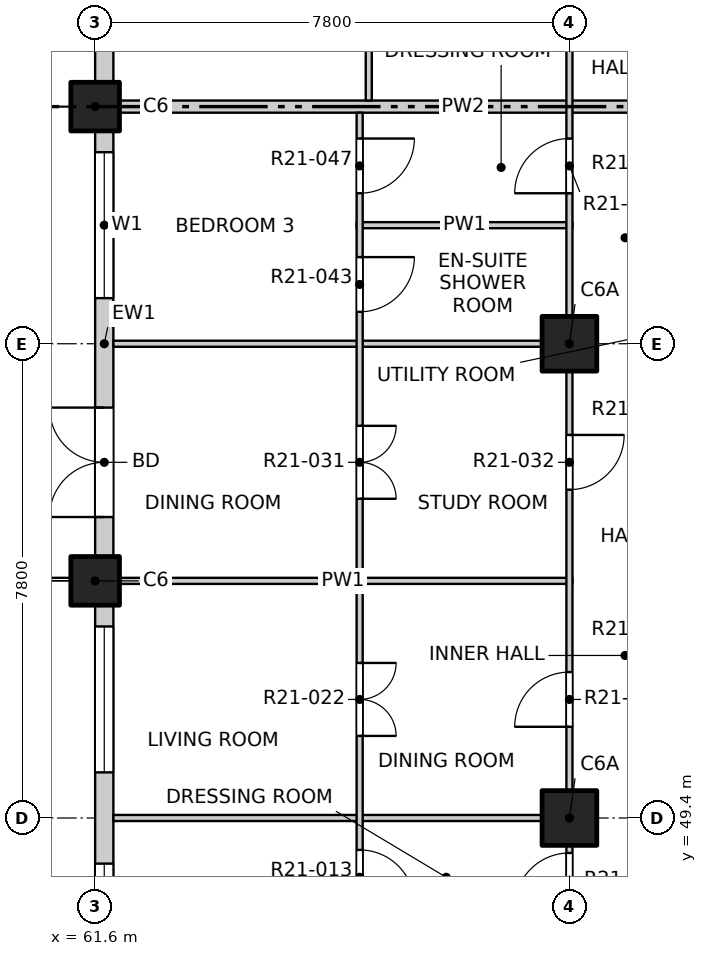
"""IFC4 building model, lengths in metres.
Left out: names, types, materials, properties, quantities, classifications, styles, units other than length and angle.
Written with IfcOpenShell. Run it as: python <this file> out.ifc"""

import sys

from ifc_helpers import new_model, si_unit, direction, frame, frame_2d, origin, origin_2d, place, context, subcontext, project, spatial, rectangle, extrude, element, fill, save


model = new_model("IFC4")
c1 = context("Model", 3, precision=1e-05, world=origin(), true_north=direction((0.0, 1.0)))
c2 = subcontext(c1, "Body", "Model", "MODEL_VIEW")
j1 = project(units=[si_unit("LENGTHUNIT", "METRE"), si_unit("PLANEANGLEUNIT", "RADIAN")], contexts=[c1])
p1 = place(None, origin())
s1 = spatial("IfcSite", under=j1, at=p1, CompositionType="ELEMENT")
p2 = place(p1, origin())
s2 = spatial("IfcBuilding", under=s1, at=p2, CompositionType="ELEMENT")
p3 = place(p2, frame((0.0, 0.0, 214.3)))
s3 = spatial("IfcBuildingStorey", under=s2, at=p3, CompositionType="ELEMENT", Elevation=214.3)
for number, where, z_axis, x_axis in (
    (1, (61.6, 53.3, -0.25), (0.0, 0.0, 1.0), (1.0, 0.0, 0.0)),
    (2, (61.6, 61.1, -0.25), (0.0, 0.0, 1.0), (1.0, 0.0, 0.0)),
):
    element("IfcColumn", number, at=place(p3, frame(where, z_axis=z_axis, x_axis=x_axis)), inside=s3, PredefinedType="COLUMN", context=c2, shape_type="SweptSolid", body=[
        extrude(rectangle(XDim=0.8, YDim=0.8, at=origin_2d()), origin(), (0.0, 0.0, 1.0), 3.4),
    ])
for number, where, z_axis, x_axis in (
    (3, (69.4, 49.4, -0.25), (0.0, 0.0, 1.0), (1.0, 0.0, 0.0)),
    (4, (69.4, 57.2, -0.25), (0.0, 0.0, 1.0), (1.0, 0.0, 0.0)),
):
    element("IfcColumn", number, at=place(p3, frame(where, z_axis=z_axis, x_axis=x_axis)), inside=s3, PredefinedType="COLUMN", context=c2, shape_type="SweptSolid", body=[
        extrude(rectangle(XDim=0.9, YDim=0.9, at=origin_2d()), origin(), (0.0, 0.0, 1.0), 3.4),
    ])
p4 = place(p3, frame((61.75, 45.5, 0.0), z_axis=(0.0, 0.0, 1.0), x_axis=(0.0, 1.0, 0.0)))
e5 = element("IfcWall", 5, at=p4, inside=s3, PredefinedType="SOLIDWALL", context=c2, shape_type="SweptSolid", body=[
    extrude(rectangle(XDim=7.4, YDim=0.3, at=frame_2d((3.7, 0.0))), origin(), (0.0, 0.0, 1.0), 2.7),
])
p5 = place(p4, frame((0.75, 0.0, 0.9)))
e6 = element("IfcOpeningElement", 6, at=p5, cuts=e5, PredefinedType="OPENING", context=c2, shape_type="SweptSolid", body=[
    extrude(rectangle(XDim=2.4, YDim=1.8, at=frame_2d((1.2, 0.9))), frame((0.0, 0.16, 0.0), z_axis=(0.0, -1.0, 0.0), x_axis=(1.0, 0.0, 0.0)), (0.0, 0.0, 1.0), 0.32),
])
p6 = place(p4, frame((4.65, 0.0, 0.9)))
e7 = element("IfcOpeningElement", 7, at=p6, cuts=e5, PredefinedType="OPENING", context=c2, shape_type="SweptSolid", body=[
    extrude(rectangle(XDim=2.4, YDim=1.8, at=frame_2d((1.2, 0.9))), frame((0.0, 0.16, 0.0), z_axis=(0.0, -1.0, 0.0), x_axis=(1.0, 0.0, 0.0)), (0.0, 0.0, 1.0), 0.32),
])
p7 = place(p3, frame((61.75, 53.7, 0.0), z_axis=(0.0, 0.0, 1.0), x_axis=(0.0, 1.0, 0.0)))
e8 = element("IfcWall", 8, at=p7, inside=s3, PredefinedType="SOLIDWALL", context=c2, shape_type="SweptSolid", body=[
    extrude(rectangle(XDim=7.0, YDim=0.3, at=frame_2d((3.5, 0.0))), origin(), (0.0, 0.0, 1.0), 2.7),
])
p8 = place(p7, frame((0.65, 0.0, 0.0)))
e9 = element("IfcOpeningElement", 9, at=p8, cuts=e8, PredefinedType="OPENING", context=c2, shape_type="SweptSolid", body=[
    extrude(rectangle(XDim=1.8, YDim=2.4, at=frame_2d((0.9, 1.2))), frame((0.0, 0.16, 0.0), z_axis=(0.0, -1.0, 0.0), x_axis=(1.0, 0.0, 0.0)), (0.0, 0.0, 1.0), 0.32),
])
p9 = place(p7, frame((4.25, 0.0, 0.9)))
e10 = element("IfcOpeningElement", 10, at=p9, cuts=e8, PredefinedType="OPENING", context=c2, shape_type="SweptSolid", body=[
    extrude(rectangle(XDim=2.4, YDim=1.8, at=frame_2d((1.2, 0.9))), frame((0.0, 0.16, 0.0), z_axis=(0.0, -1.0, 0.0), x_axis=(1.0, 0.0, 0.0)), (0.0, 0.0, 1.0), 0.32),
])
p10 = place(p3, frame((61.75, 61.5, 0.0), z_axis=(0.0, 0.0, 1.0), x_axis=(0.0, 1.0, 0.0)))
e11 = element("IfcWall", 11, at=p10, inside=s3, PredefinedType="SOLIDWALL", context=c2, shape_type="SweptSolid", body=[
    extrude(rectangle(XDim=7.0, YDim=0.3, at=frame_2d((3.5, 0.0))), origin(), (0.0, 0.0, 1.0), 2.7),
])
p11 = place(p10, frame((0.65, 0.0, 0.0)))
e12 = element("IfcOpeningElement", 12, at=p11, cuts=e11, PredefinedType="OPENING", context=c2, shape_type="SweptSolid", body=[
    extrude(rectangle(XDim=1.8, YDim=2.4, at=frame_2d((0.9, 1.2))), frame((0.0, 0.16, 0.0), z_axis=(0.0, -1.0, 0.0), x_axis=(1.0, 0.0, 0.0)), (0.0, 0.0, 1.0), 0.32),
])
p12 = place(p10, frame((4.25, 0.0, 0.9)))
e13 = element("IfcOpeningElement", 13, at=p12, cuts=e11, PredefinedType="OPENING", context=c2, shape_type="SweptSolid", body=[
    extrude(rectangle(XDim=2.4, YDim=1.8, at=frame_2d((1.2, 0.9))), frame((0.0, 0.16, 0.0), z_axis=(0.0, -1.0, 0.0), x_axis=(1.0, 0.0, 0.0)), (0.0, 0.0, 1.0), 0.32),
])
for number, where, z_axis, x_axis in (
    (14, (61.9, 49.4, 0.0), (0.0, 0.0, 1.0), (1.0, 0.0, 0.0)),
    (15, (61.9, 53.3, 0.0), (0.0, 0.0, 1.0), (1.0, 0.0, 0.0)),
    (16, (61.9, 57.2, 0.0), (0.0, 0.0, 1.0), (1.0, 0.0, 0.0)),
):
    element("IfcWall", number, at=place(p3, frame(where, z_axis=z_axis, x_axis=x_axis)), inside=s3, PredefinedType="PARTITIONING", context=c2, shape_type="SweptSolid", body=[
        extrude(rectangle(XDim=7.55, YDim=0.1, at=frame_2d((3.775, 0.0))), origin(), (0.0, 0.0, 1.0), 3.15),
    ])
p13 = place(p3, frame((65.9, 59.15, 0.0), z_axis=(0.0, 0.0, 1.0), x_axis=(1.0, 0.0, 0.0)))
e17 = element("IfcWall", 17, at=p13, inside=s3, PredefinedType="PARTITIONING", context=c2, shape_type="SweptSolid", body=[
    extrude(rectangle(XDim=3.55, YDim=0.1, at=frame_2d((1.775, 0.0))), origin(), (0.0, 0.0, 1.0), 3.15),
])
p14 = place(p3, frame((61.9, 61.1, 0.0), z_axis=(0.0, 0.0, 1.0), x_axis=(1.0, 0.0, 0.0)))
e18 = element("IfcWall", 18, at=p14, inside=s3, PredefinedType="PARTITIONING", context=c2, shape_type="SweptSolid", body=[
    extrude(rectangle(XDim=11.5, YDim=0.2, at=frame_2d((5.75, 0.0))), origin(), (0.0, 0.0, 1.0), 2.55),
])
p15 = place(p3, frame((65.95, 41.9, 0.0), z_axis=(0.0, 0.0, 1.0), x_axis=(0.0, 1.0, 0.0)))
e19 = element("IfcWall", 19, at=p15, inside=s3, PredefinedType="PARTITIONING", context=c2, shape_type="SweptSolid", body=[
    extrude(rectangle(XDim=19.1, YDim=0.1, at=frame_2d((9.55, 0.0))), origin(), (0.0, 0.0, 1.0), 3.15),
])
p16 = place(p15, frame((1.05, 0.0, 0.0)))
e20 = element("IfcOpeningElement", 20, at=p16, cuts=e19, PredefinedType="OPENING", context=c2, shape_type="SweptSolid", body=[
    extrude(rectangle(XDim=1.2, YDim=2.1, at=frame_2d((0.6, 1.05))), frame((0.0, 0.06, 0.0), z_axis=(0.0, -1.0, 0.0), x_axis=(1.0, 0.0, 0.0)), (0.0, 0.0, 1.0), 0.12),
])
p17 = place(p15, frame((4.125, 0.0, 0.0)))
e21 = element("IfcOpeningElement", 21, at=p17, cuts=e19, PredefinedType="OPENING", context=c2, shape_type="SweptSolid", body=[
    extrude(rectangle(XDim=0.9, YDim=2.1, at=frame_2d((0.45, 1.05))), frame((0.0, 0.06, 0.0), z_axis=(0.0, -1.0, 0.0), x_axis=(1.0, 0.0, 0.0)), (0.0, 0.0, 1.0), 0.12),
])
p18 = place(p15, frame((6.075, 0.0, 0.0)))
e22 = element("IfcOpeningElement", 22, at=p18, cuts=e19, PredefinedType="OPENING", context=c2, shape_type="SweptSolid", body=[
    extrude(rectangle(XDim=0.9, YDim=2.1, at=frame_2d((0.45, 1.05))), frame((0.0, 0.06, 0.0), z_axis=(0.0, -1.0, 0.0), x_axis=(1.0, 0.0, 0.0)), (0.0, 0.0, 1.0), 0.12),
])
p19 = place(p15, frame((8.85, 0.0, 0.0)))
e23 = element("IfcOpeningElement", 23, at=p19, cuts=e19, PredefinedType="OPENING", context=c2, shape_type="SweptSolid", body=[
    extrude(rectangle(XDim=1.2, YDim=2.1, at=frame_2d((0.6, 1.05))), frame((0.0, 0.06, 0.0), z_axis=(0.0, -1.0, 0.0), x_axis=(1.0, 0.0, 0.0)), (0.0, 0.0, 1.0), 0.12),
])
p20 = place(p15, frame((12.75, 0.0, 0.0)))
e24 = element("IfcOpeningElement", 24, at=p20, cuts=e19, PredefinedType="OPENING", context=c2, shape_type="SweptSolid", body=[
    extrude(rectangle(XDim=1.2, YDim=2.1, at=frame_2d((0.6, 1.05))), frame((0.0, 0.06, 0.0), z_axis=(0.0, -1.0, 0.0), x_axis=(1.0, 0.0, 0.0)), (0.0, 0.0, 1.0), 0.12),
])
p21 = place(p15, frame((15.825, 0.0, 0.0)))
e25 = element("IfcOpeningElement", 25, at=p21, cuts=e19, PredefinedType="OPENING", context=c2, shape_type="SweptSolid", body=[
    extrude(rectangle(XDim=0.9, YDim=2.1, at=frame_2d((0.45, 1.05))), frame((0.0, 0.06, 0.0), z_axis=(0.0, -1.0, 0.0), x_axis=(1.0, 0.0, 0.0)), (0.0, 0.0, 1.0), 0.12),
])
p22 = place(p15, frame((17.775, 0.0, 0.0)))
e26 = element("IfcOpeningElement", 26, at=p22, cuts=e19, PredefinedType="OPENING", context=c2, shape_type="SweptSolid", body=[
    extrude(rectangle(XDim=0.9, YDim=2.1, at=frame_2d((0.45, 1.05))), frame((0.0, 0.06, 0.0), z_axis=(0.0, -1.0, 0.0), x_axis=(1.0, 0.0, 0.0)), (0.0, 0.0, 1.0), 0.12),
])
p23 = place(p3, frame((66.1, 61.2, 0.0), z_axis=(0.0, 0.0, 1.0), x_axis=(0.0, 1.0, 0.0)))
e27 = element("IfcWall", 27, at=p23, inside=s3, PredefinedType="PARTITIONING", context=c2, shape_type="SweptSolid", body=[
    extrude(rectangle(XDim=26.9, YDim=0.1, at=frame_2d((13.45, 0.0))), origin(), (0.0, 0.0, 1.0), 3.15),
])
p24 = place(p23, frame((1.25, 0.0, 0.0)))
e28 = element("IfcOpeningElement", 28, at=p24, cuts=e27, PredefinedType="OPENING", context=c2, shape_type="SweptSolid", body=[
    extrude(rectangle(XDim=1.2, YDim=2.1, at=frame_2d((0.6, 1.05))), frame((0.0, 0.06, 0.0), z_axis=(0.0, -1.0, 0.0), x_axis=(1.0, 0.0, 0.0)), (0.0, 0.0, 1.0), 0.12),
])
p25 = place(p23, frame((5.15, 0.0, 0.0)))
e29 = element("IfcOpeningElement", 29, at=p25, cuts=e27, PredefinedType="OPENING", context=c2, shape_type="SweptSolid", body=[
    extrude(rectangle(XDim=1.2, YDim=2.1, at=frame_2d((0.6, 1.05))), frame((0.0, 0.06, 0.0), z_axis=(0.0, -1.0, 0.0), x_axis=(1.0, 0.0, 0.0)), (0.0, 0.0, 1.0), 0.12),
])
p26 = place(p23, frame((8.225, 0.0, 0.0)))
e30 = element("IfcOpeningElement", 30, at=p26, cuts=e27, PredefinedType="OPENING", context=c2, shape_type="SweptSolid", body=[
    extrude(rectangle(XDim=0.9, YDim=2.1, at=frame_2d((0.45, 1.05))), frame((0.0, 0.06, 0.0), z_axis=(0.0, -1.0, 0.0), x_axis=(1.0, 0.0, 0.0)), (0.0, 0.0, 1.0), 0.12),
])
p27 = place(p23, frame((10.175, 0.0, 0.0)))
e31 = element("IfcOpeningElement", 31, at=p27, cuts=e27, PredefinedType="OPENING", context=c2, shape_type="SweptSolid", body=[
    extrude(rectangle(XDim=0.9, YDim=2.1, at=frame_2d((0.45, 1.05))), frame((0.0, 0.06, 0.0), z_axis=(0.0, -1.0, 0.0), x_axis=(1.0, 0.0, 0.0)), (0.0, 0.0, 1.0), 0.12),
])
p28 = place(p23, frame((12.125, 0.0, 0.0)))
e32 = element("IfcOpeningElement", 32, at=p28, cuts=e27, PredefinedType="OPENING", context=c2, shape_type="SweptSolid", body=[
    extrude(rectangle(XDim=0.9, YDim=2.1, at=frame_2d((0.45, 1.05))), frame((0.0, 0.06, 0.0), z_axis=(0.0, -1.0, 0.0), x_axis=(1.0, 0.0, 0.0)), (0.0, 0.0, 1.0), 0.12),
])
p29 = place(p23, frame((14.075, 0.0, 0.0)))
e33 = element("IfcOpeningElement", 33, at=p29, cuts=e27, PredefinedType="OPENING", context=c2, shape_type="SweptSolid", body=[
    extrude(rectangle(XDim=0.9, YDim=2.1, at=frame_2d((0.45, 1.05))), frame((0.0, 0.06, 0.0), z_axis=(0.0, -1.0, 0.0), x_axis=(1.0, 0.0, 0.0)), (0.0, 0.0, 1.0), 0.12),
])
p30 = place(p23, frame((16.85, 0.0, 0.0)))
e34 = element("IfcOpeningElement", 34, at=p30, cuts=e27, PredefinedType="OPENING", context=c2, shape_type="SweptSolid", body=[
    extrude(rectangle(XDim=1.2, YDim=2.1, at=frame_2d((0.6, 1.05))), frame((0.0, 0.06, 0.0), z_axis=(0.0, -1.0, 0.0), x_axis=(1.0, 0.0, 0.0)), (0.0, 0.0, 1.0), 0.12),
])
p31 = place(p23, frame((19.925, 0.0, 0.0)))
e35 = element("IfcOpeningElement", 35, at=p31, cuts=e27, PredefinedType="OPENING", context=c2, shape_type="SweptSolid", body=[
    extrude(rectangle(XDim=0.9, YDim=2.1, at=frame_2d((0.45, 1.05))), frame((0.0, 0.06, 0.0), z_axis=(0.0, -1.0, 0.0), x_axis=(1.0, 0.0, 0.0)), (0.0, 0.0, 1.0), 0.12),
])
p32 = place(p23, frame((21.875, 0.0, 0.0)))
e36 = element("IfcOpeningElement", 36, at=p32, cuts=e27, PredefinedType="OPENING", context=c2, shape_type="SweptSolid", body=[
    extrude(rectangle(XDim=0.9, YDim=2.1, at=frame_2d((0.45, 1.05))), frame((0.0, 0.06, 0.0), z_axis=(0.0, -1.0, 0.0), x_axis=(1.0, 0.0, 0.0)), (0.0, 0.0, 1.0), 0.12),
])
p33 = place(p23, frame((24.65, 0.0, 0.0)))
e37 = element("IfcOpeningElement", 37, at=p33, cuts=e27, PredefinedType="OPENING", context=c2, shape_type="SweptSolid", body=[
    extrude(rectangle(XDim=1.2, YDim=2.1, at=frame_2d((0.6, 1.05))), frame((0.0, 0.06, 0.0), z_axis=(0.0, -1.0, 0.0), x_axis=(1.0, 0.0, 0.0)), (0.0, 0.0, 1.0), 0.12),
])
p34 = place(p3, frame((69.4, 41.9, 0.0), z_axis=(0.0, 0.0, 1.0), x_axis=(0.0, 1.0, 0.0)))
e38 = element("IfcWall", 38, at=p34, inside=s3, PredefinedType="PARTITIONING", context=c2, shape_type="SweptSolid", body=[
    extrude(rectangle(XDim=46.2, YDim=0.1, at=frame_2d((23.1, 0.0))), origin(), (0.0, 0.0, 1.0), 3.15),
])
p35 = place(p34, frame((1.2, 0.0, 0.0)))
e39 = element("IfcOpeningElement", 39, at=p35, cuts=e38, PredefinedType="OPENING", context=c2, shape_type="SweptSolid", body=[
    extrude(rectangle(XDim=0.9, YDim=2.1, at=frame_2d((0.45, 1.05))), frame((0.0, 0.06, 0.0), z_axis=(0.0, -1.0, 0.0), x_axis=(1.0, 0.0, 0.0)), (0.0, 0.0, 1.0), 0.12),
])
p36 = place(p34, frame((6.025, 0.0, 0.0)))
e40 = element("IfcOpeningElement", 40, at=p36, cuts=e38, PredefinedType="OPENING", context=c2, shape_type="SweptSolid", body=[
    extrude(rectangle(XDim=0.9, YDim=2.1, at=frame_2d((0.45, 1.05))), frame((0.0, 0.06, 0.0), z_axis=(0.0, -1.0, 0.0), x_axis=(1.0, 0.0, 0.0)), (0.0, 0.0, 1.0), 0.12),
])
p37 = place(p34, frame((9.0, 0.0, 0.0)))
e41 = element("IfcOpeningElement", 41, at=p37, cuts=e38, PredefinedType="OPENING", context=c2, shape_type="SweptSolid", body=[
    extrude(rectangle(XDim=0.9, YDim=2.1, at=frame_2d((0.45, 1.05))), frame((0.0, 0.06, 0.0), z_axis=(0.0, -1.0, 0.0), x_axis=(1.0, 0.0, 0.0)), (0.0, 0.0, 1.0), 0.12),
])
p38 = place(p34, frame((12.9, 0.0, 0.0)))
e42 = element("IfcOpeningElement", 42, at=p38, cuts=e38, PredefinedType="OPENING", context=c2, shape_type="SweptSolid", body=[
    extrude(rectangle(XDim=0.9, YDim=2.1, at=frame_2d((0.45, 1.05))), frame((0.0, 0.06, 0.0), z_axis=(0.0, -1.0, 0.0), x_axis=(1.0, 0.0, 0.0)), (0.0, 0.0, 1.0), 0.12),
])
p39 = place(p34, frame((17.775, 0.0, 0.0)))
e43 = element("IfcOpeningElement", 43, at=p39, cuts=e38, PredefinedType="OPENING", context=c2, shape_type="SweptSolid", body=[
    extrude(rectangle(XDim=0.9, YDim=2.1, at=frame_2d((0.45, 1.05))), frame((0.0, 0.06, 0.0), z_axis=(0.0, -1.0, 0.0), x_axis=(1.0, 0.0, 0.0)), (0.0, 0.0, 1.0), 0.12),
])
p40 = place(p34, frame((20.7, 0.0, 0.0)))
e44 = element("IfcOpeningElement", 44, at=p40, cuts=e38, PredefinedType="OPENING", context=c2, shape_type="SweptSolid", body=[
    extrude(rectangle(XDim=0.9, YDim=2.1, at=frame_2d((0.45, 1.05))), frame((0.0, 0.06, 0.0), z_axis=(0.0, -1.0, 0.0), x_axis=(1.0, 0.0, 0.0)), (0.0, 0.0, 1.0), 0.12),
])
p41 = place(p34, frame((24.6, 0.0, 0.0)))
e45 = element("IfcOpeningElement", 45, at=p41, cuts=e38, PredefinedType="OPENING", context=c2, shape_type="SweptSolid", body=[
    extrude(rectangle(XDim=0.9, YDim=2.1, at=frame_2d((0.45, 1.05))), frame((0.0, 0.06, 0.0), z_axis=(0.0, -1.0, 0.0), x_axis=(1.0, 0.0, 0.0)), (0.0, 0.0, 1.0), 0.12),
])
p42 = place(p34, frame((29.425, 0.0, 0.0)))
e46 = element("IfcOpeningElement", 46, at=p42, cuts=e38, PredefinedType="OPENING", context=c2, shape_type="SweptSolid", body=[
    extrude(rectangle(XDim=0.9, YDim=2.1, at=frame_2d((0.45, 1.05))), frame((0.0, 0.06, 0.0), z_axis=(0.0, -1.0, 0.0), x_axis=(1.0, 0.0, 0.0)), (0.0, 0.0, 1.0), 0.12),
])
p43 = place(p34, frame((33.375, 0.0, 0.0)))
e47 = element("IfcOpeningElement", 47, at=p43, cuts=e38, PredefinedType="OPENING", context=c2, shape_type="SweptSolid", body=[
    extrude(rectangle(XDim=0.9, YDim=2.1, at=frame_2d((0.45, 1.05))), frame((0.0, 0.06, 0.0), z_axis=(0.0, -1.0, 0.0), x_axis=(1.0, 0.0, 0.0)), (0.0, 0.0, 1.0), 0.12),
])
p44 = place(p34, frame((36.3, 0.0, 0.0)))
e48 = element("IfcOpeningElement", 48, at=p44, cuts=e38, PredefinedType="OPENING", context=c2, shape_type="SweptSolid", body=[
    extrude(rectangle(XDim=0.9, YDim=2.1, at=frame_2d((0.45, 1.05))), frame((0.0, 0.06, 0.0), z_axis=(0.0, -1.0, 0.0), x_axis=(1.0, 0.0, 0.0)), (0.0, 0.0, 1.0), 0.12),
])
p45 = place(p34, frame((41.175, 0.0, 0.0)))
e49 = element("IfcOpeningElement", 49, at=p45, cuts=e38, PredefinedType="OPENING", context=c2, shape_type="SweptSolid", body=[
    extrude(rectangle(XDim=0.9, YDim=2.1, at=frame_2d((0.45, 1.05))), frame((0.0, 0.06, 0.0), z_axis=(0.0, -1.0, 0.0), x_axis=(1.0, 0.0, 0.0)), (0.0, 0.0, 1.0), 0.12),
])
p46 = place(p34, frame((44.1, 0.0, 0.0)))
e50 = element("IfcOpeningElement", 50, at=p46, cuts=e38, PredefinedType="OPENING", context=c2, shape_type="SweptSolid", body=[
    extrude(rectangle(XDim=0.9, YDim=2.1, at=frame_2d((0.45, 1.05))), frame((0.0, 0.06, 0.0), z_axis=(0.0, -1.0, 0.0), x_axis=(1.0, 0.0, 0.0)), (0.0, 0.0, 1.0), 0.12),
])
p47 = place(p5, origin())
e51 = element("IfcWindow", 51, at=p47, inside=s3, PartitioningType="DOUBLE_PANEL_VERTICAL", PredefinedType="WINDOW", context=c2, shape_type="SweptSolid", body=[
    extrude(rectangle(XDim=2.4, YDim=1.8, at=frame_2d((1.2, 0.9))), frame((0.0, 0.03, 0.0), z_axis=(0.0, -1.0, 0.0), x_axis=(1.0, 0.0, 0.0)), (0.0, 0.0, 1.0), 0.06),
])
fill(e6, e51)
p48 = place(p6, origin())
e52 = element("IfcWindow", 52, at=p48, inside=s3, PartitioningType="DOUBLE_PANEL_VERTICAL", PredefinedType="WINDOW", context=c2, shape_type="SweptSolid", body=[
    extrude(rectangle(XDim=2.4, YDim=1.8, at=frame_2d((1.2, 0.9))), frame((0.0, 0.03, 0.0), z_axis=(0.0, -1.0, 0.0), x_axis=(1.0, 0.0, 0.0)), (0.0, 0.0, 1.0), 0.06),
])
fill(e7, e52)
p49 = place(p8, origin())
e53 = element("IfcDoor", 53, at=p49, inside=s3, OperationType="DOUBLE_DOOR_SINGLE_SWING", PredefinedType="DOOR", context=c2, shape_type="SweptSolid", body=[
    extrude(rectangle(XDim=1.8, YDim=2.4, at=frame_2d((0.9, 1.2))), frame((0.0, 0.025, 0.0), z_axis=(0.0, -1.0, 0.0), x_axis=(1.0, 0.0, 0.0)), (0.0, 0.0, 1.0), 0.05),
])
fill(e9, e53)
p50 = place(p9, origin())
e54 = element("IfcWindow", 54, at=p50, inside=s3, PartitioningType="DOUBLE_PANEL_VERTICAL", PredefinedType="WINDOW", context=c2, shape_type="SweptSolid", body=[
    extrude(rectangle(XDim=2.4, YDim=1.8, at=frame_2d((1.2, 0.9))), frame((0.0, 0.03, 0.0), z_axis=(0.0, -1.0, 0.0), x_axis=(1.0, 0.0, 0.0)), (0.0, 0.0, 1.0), 0.06),
])
fill(e10, e54)
p51 = place(p36, origin())
e55 = element("IfcDoor", 55, at=p51, inside=s3, OperationType="SINGLE_SWING_LEFT", PredefinedType="DOOR", context=c2, shape_type="SweptSolid", body=[
    extrude(rectangle(XDim=0.9, YDim=2.1, at=frame_2d((0.45, 1.05))), frame((0.0, 0.025, 0.0), z_axis=(0.0, -1.0, 0.0), x_axis=(1.0, 0.0, 0.0)), (0.0, 0.0, 1.0), 0.05),
])
fill(e40, e55)
p52 = place(p18, origin())
e56 = element("IfcDoor", 56, at=p52, inside=s3, OperationType="SINGLE_SWING_RIGHT", PredefinedType="DOOR", context=c2, shape_type="SweptSolid", body=[
    extrude(rectangle(XDim=0.9, YDim=2.1, at=frame_2d((0.45, 1.05))), frame((0.0, 0.025, 0.0), z_axis=(0.0, -1.0, 0.0), x_axis=(1.0, 0.0, 0.0)), (0.0, 0.0, 1.0), 0.05),
])
fill(e22, e56)
p53 = place(p19, origin())
e57 = element("IfcDoor", 57, at=p53, inside=s3, OperationType="DOUBLE_DOOR_SINGLE_SWING", PredefinedType="DOOR", context=c2, shape_type="SweptSolid", body=[
    extrude(rectangle(XDim=1.2, YDim=2.1, at=frame_2d((0.6, 1.05))), frame((0.0, 0.025, 0.0), z_axis=(0.0, -1.0, 0.0), x_axis=(1.0, 0.0, 0.0)), (0.0, 0.0, 1.0), 0.05),
])
fill(e23, e57)
p54 = place(p37, origin())
e58 = element("IfcDoor", 58, at=p54, inside=s3, OperationType="SINGLE_SWING_LEFT", PredefinedType="DOOR", context=c2, shape_type="SweptSolid", body=[
    extrude(rectangle(XDim=0.9, YDim=2.1, at=frame_2d((0.45, 1.05))), frame((0.0, 0.025, 0.0), z_axis=(0.0, -1.0, 0.0), x_axis=(1.0, 0.0, 0.0)), (0.0, 0.0, 1.0), 0.05),
])
fill(e41, e58)
p55 = place(p20, origin())
e59 = element("IfcDoor", 59, at=p55, inside=s3, OperationType="DOUBLE_DOOR_SINGLE_SWING", PredefinedType="DOOR", context=c2, shape_type="SweptSolid", body=[
    extrude(rectangle(XDim=1.2, YDim=2.1, at=frame_2d((0.6, 1.05))), frame((0.0, 0.025, 0.0), z_axis=(0.0, -1.0, 0.0), x_axis=(1.0, 0.0, 0.0)), (0.0, 0.0, 1.0), 0.05),
])
fill(e24, e59)
p56 = place(p38, origin())
e60 = element("IfcDoor", 60, at=p56, inside=s3, OperationType="SINGLE_SWING_LEFT", PredefinedType="DOOR", context=c2, shape_type="SweptSolid", body=[
    extrude(rectangle(XDim=0.9, YDim=2.1, at=frame_2d((0.45, 1.05))), frame((0.0, 0.025, 0.0), z_axis=(0.0, -1.0, 0.0), x_axis=(1.0, 0.0, 0.0)), (0.0, 0.0, 1.0), 0.05),
])
fill(e42, e60)
p57 = place(p21, origin())
e61 = element("IfcDoor", 61, at=p57, inside=s3, OperationType="SINGLE_SWING_LEFT", PredefinedType="DOOR", context=c2, shape_type="SweptSolid", body=[
    extrude(rectangle(XDim=0.9, YDim=2.1, at=frame_2d((0.45, 1.05))), frame((0.0, 0.025, 0.0), z_axis=(0.0, -1.0, 0.0), x_axis=(1.0, 0.0, 0.0)), (0.0, 0.0, 1.0), 0.05),
])
fill(e25, e61)
p58 = place(p22, origin())
e62 = element("IfcDoor", 62, at=p58, inside=s3, OperationType="SINGLE_SWING_LEFT", PredefinedType="DOOR", context=c2, shape_type="SweptSolid", body=[
    extrude(rectangle(XDim=0.9, YDim=2.1, at=frame_2d((0.45, 1.05))), frame((0.0, 0.025, 0.0), z_axis=(0.0, -1.0, 0.0), x_axis=(1.0, 0.0, 0.0)), (0.0, 0.0, 1.0), 0.05),
])
fill(e26, e62)
p59 = place(p39, origin())
e63 = element("IfcDoor", 63, at=p59, inside=s3, OperationType="SINGLE_SWING_LEFT", PredefinedType="DOOR", context=c2, shape_type="SweptSolid", body=[
    extrude(rectangle(XDim=0.9, YDim=2.1, at=frame_2d((0.45, 1.05))), frame((0.0, 0.025, 0.0), z_axis=(0.0, -1.0, 0.0), x_axis=(1.0, 0.0, 0.0)), (0.0, 0.0, 1.0), 0.05),
])
fill(e43, e63)
save(model, sys.argv[1])
